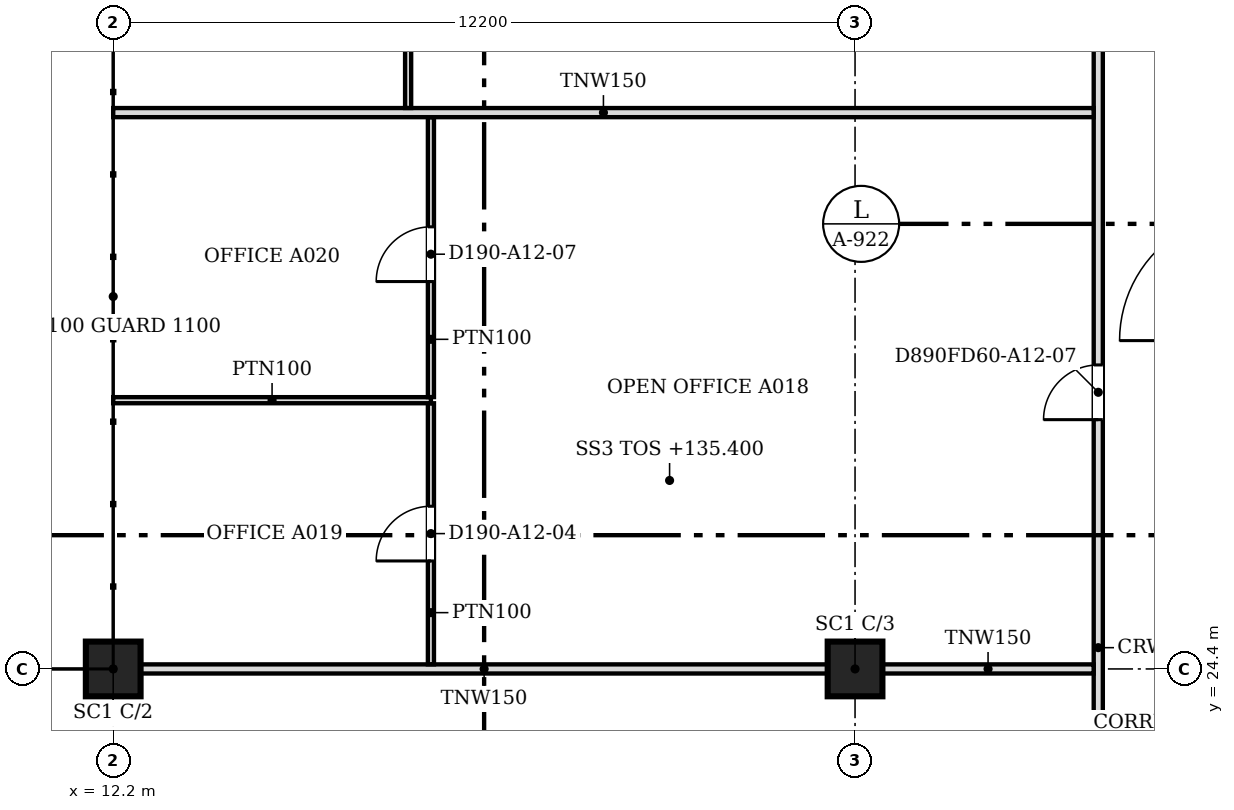
"""IFC4 building model, lengths in metres.
Left out: names, types, materials, properties, quantities, classifications, styles, units other than length and angle.
Written with IfcOpenShell. Run it as: python <this file> out.ifc"""

import sys

from ifc_helpers import new_model, si_unit, direction, frame, frame_2d, origin, origin_2d, place, context, subcontext, project, spatial, rectangle, extrude, source, transform, mapped, element, fill, save


model = new_model("IFC4")
c1 = context("Model", 3, precision=1e-05, world=origin(), true_north=direction((0.0, 1.0)))
c2 = subcontext(c1, "Body", "Model", "MODEL_VIEW")
j1 = project(units=[si_unit("LENGTHUNIT", "METRE"), si_unit("PLANEANGLEUNIT", "RADIAN")], contexts=[c1])
p1 = place(None, origin())
s1 = spatial("IfcSite", under=j1, at=p1, CompositionType="ELEMENT")
p2 = place(p1, origin())
s2 = spatial("IfcBuilding", under=s1, at=p2, CompositionType="ELEMENT")
p3 = place(p2, frame((0.0, 0.0, 135.4)))
s3 = spatial("IfcBuildingStorey", under=s2, at=p3, CompositionType="ELEMENT", Elevation=135.4)
for number, where, z_axis, x_axis in (
    (1, (12.2, 24.4, 0.0), (0.0, 0.0, 1.0), (1.0, 0.0, 0.0)),
    (2, (24.4, 24.4, 0.0), (0.0, 0.0, 1.0), (1.0, 0.0, 0.0)),
):
    element("IfcColumn", number, at=place(p3, frame(where, z_axis=z_axis, x_axis=x_axis)), inside=s3, PredefinedType="COLUMN", context=c2, shape_type="SweptSolid", body=[
        extrude(rectangle(XDim=0.9, YDim=0.9, at=origin_2d()), origin(), (0.0, 0.0, 1.0), 3.6),
    ])
p4 = place(p3, frame((28.4, 18.8, 0.0), z_axis=(0.0, 0.0, 1.0), x_axis=(0.0, 1.0, 0.0)))
e3 = element("IfcWall", 3, at=p4, inside=s3, PredefinedType="PARTITIONING", context=c2, shape_type="SweptSolid", body=[
    extrude(rectangle(XDim=26.824, YDim=0.15, at=frame_2d((13.412, 0.0))), origin(), (0.0, 0.0, 1.0), 3.067),
])
m1 = source(origin(), c2, "Body", "SweptSolid", [
    extrude(rectangle(XDim=0.9, YDim=2.1, at=frame_2d((0.45, 1.05))), frame((0.0, 0.085, 0.0), z_axis=(0.0, -1.0, 0.0), x_axis=(1.0, 0.0, 0.0)), (0.0, 0.0, 1.0), 0.17),
])
p5 = place(p4, frame((1.3, 0.0, 0.0)))
e4 = element("IfcOpeningElement", 4, at=p5, cuts=e3, PredefinedType="OPENING", context=c2, shape_type="MappedRepresentation", body=[
    mapped(m1, transform((0.0, 0.0, 0.0), scale=1.0)),
])
p6 = place(p4, frame((23.351, 0.0, 0.0)))
e5 = element("IfcOpeningElement", 5, at=p6, cuts=e3, PredefinedType="OPENING", context=c2, shape_type="MappedRepresentation", body=[
    mapped(m1, transform((0.0, 0.0, 0.0), scale=1.0)),
])
p7 = place(p4, frame((17.351, 0.0, 0.0)))
e6 = element("IfcOpeningElement", 6, at=p7, cuts=e3, PredefinedType="OPENING", context=c2, shape_type="MappedRepresentation", body=[
    mapped(m1, transform((0.0, 0.0, 0.0), scale=1.0)),
])
p8 = place(p4, frame((9.7, 0.0, 0.0)))
e7 = element("IfcOpeningElement", 7, at=p8, cuts=e3, PredefinedType="OPENING", context=c2, shape_type="MappedRepresentation", body=[
    mapped(m1, transform((0.0, 0.0, 0.0), scale=1.0)),
])
p9 = place(p3, frame((12.651, 24.4, 0.0), z_axis=(0.0, 0.0, 1.0), x_axis=(1.0, 0.0, 0.0)))
e8 = element("IfcWall", 8, at=p9, inside=s3, PredefinedType="PARTITIONING", context=c2, shape_type="SweptSolid", body=[
    extrude(rectangle(XDim=11.298, YDim=0.15, at=frame_2d((5.649, 0.0))), origin(), (0.0, 0.0, 1.0), 3.067),
])
p10 = place(p3, frame((24.851, 24.4, 0.0), z_axis=(0.0, 0.0, 1.0), x_axis=(1.0, 0.0, 0.0)))
e9 = element("IfcWall", 9, at=p10, inside=s3, PredefinedType="PARTITIONING", context=c2, shape_type="SweptSolid", body=[
    extrude(rectangle(XDim=3.473, YDim=0.15, at=frame_2d((1.736, 0.0))), origin(), (0.0, 0.0, 1.0), 3.067),
])
p11 = place(p3, frame((17.425, 24.476, 0.0), z_axis=(0.0, 0.0, 1.0), x_axis=(0.0, 1.0, 0.0)))
e10 = element("IfcWall", 10, at=p11, inside=s3, PredefinedType="PARTITIONING", context=c2, shape_type="SweptSolid", body=[
    extrude(rectangle(XDim=4.293, YDim=0.1, at=frame_2d((2.146, 0.0))), origin(), (0.0, 0.0, 1.0), 3.067),
])
m2 = source(origin(), c2, "Body", "SweptSolid", [
    extrude(rectangle(XDim=0.9, YDim=2.1, at=frame_2d((0.45, 1.05))), frame((0.0, 0.06, 0.0), z_axis=(0.0, -1.0, 0.0), x_axis=(1.0, 0.0, 0.0)), (0.0, 0.0, 1.0), 0.12),
])
p12 = place(p11, frame((1.7, 0.0, 0.0)))
e11 = element("IfcOpeningElement", 11, at=p12, cuts=e10, PredefinedType="OPENING", context=c2, shape_type="MappedRepresentation", body=[
    mapped(m2, transform((0.0, 0.0, 0.0), scale=1.0)),
])
p13 = place(p3, frame((12.2, 28.82, 0.0), z_axis=(0.0, 0.0, 1.0), x_axis=(1.0, 0.0, 0.0)))
e12 = element("IfcWall", 12, at=p13, inside=s3, PredefinedType="PARTITIONING", context=c2, shape_type="SweptSolid", body=[
    extrude(rectangle(XDim=5.225, YDim=0.1, at=frame_2d((2.613, 0.0))), origin(), (0.0, 0.0, 1.0), 3.067),
])
p14 = place(p3, frame((17.425, 28.871, 0.0), z_axis=(0.0, 0.0, 1.0), x_axis=(0.0, 1.0, 0.0)))
e13 = element("IfcWall", 13, at=p14, inside=s3, PredefinedType="PARTITIONING", context=c2, shape_type="SweptSolid", body=[
    extrude(rectangle(XDim=4.603, YDim=0.1, at=frame_2d((2.301, 0.0))), origin(), (0.0, 0.0, 1.0), 3.067),
])
p15 = place(p14, frame((1.9, 0.0, 0.0)))
e14 = element("IfcOpeningElement", 14, at=p15, cuts=e13, PredefinedType="OPENING", context=c2, shape_type="MappedRepresentation", body=[
    mapped(m2, transform((0.0, 0.0, 0.0), scale=1.0)),
])
p16 = place(p3, frame((12.2, 33.55, 0.0), z_axis=(0.0, 0.0, 1.0), x_axis=(1.0, 0.0, 0.0)))
e15 = element("IfcWall", 15, at=p16, inside=s3, PredefinedType="PARTITIONING", context=c2, shape_type="SweptSolid", body=[
    extrude(rectangle(XDim=16.124, YDim=0.15, at=frame_2d((8.062, 0.0))), origin(), (0.0, 0.0, 1.0), 3.067),
])
p17 = place(p3, frame((17.05, 33.626, 0.0), z_axis=(0.0, 0.0, 1.0), x_axis=(0.0, 1.0, 0.0)))
e16 = element("IfcWall", 16, at=p17, inside=s3, PredefinedType="PARTITIONING", context=c2, shape_type="SweptSolid", body=[
    extrude(rectangle(XDim=5.948, YDim=0.1, at=frame_2d((2.974, 0.0))), origin(), (0.0, 0.0, 1.0), 3.067),
])
p18 = place(p17, frame((2.5, 0.0, 0.0)))
e17 = element("IfcOpeningElement", 17, at=p18, cuts=e16, PredefinedType="OPENING", context=c2, shape_type="MappedRepresentation", body=[
    mapped(m2, transform((0.0, 0.0, 0.0), scale=1.0)),
])
m3 = source(origin(), c2, "Body", "SweptSolid", [
    extrude(rectangle(XDim=0.9, YDim=2.1, at=frame_2d((0.45, 1.05))), frame((0.0, 0.025, 0.0), z_axis=(0.0, -1.0, 0.0), x_axis=(1.0, 0.0, 0.0)), (0.0, 0.0, 1.0), 0.05),
])
p19 = place(p12, origin())
e18 = element("IfcDoor", 18, at=p19, inside=s3, OperationType="SINGLE_SWING_LEFT", PredefinedType="DOOR", context=c2, shape_type="MappedRepresentation", body=[
    mapped(m3, transform((0.0, 0.0, 0.0), scale=1.0)),
])
fill(e11, e18)
p20 = place(p15, origin())
e19 = element("IfcDoor", 19, at=p20, inside=s3, OperationType="SINGLE_SWING_LEFT", PredefinedType="DOOR", context=c2, shape_type="MappedRepresentation", body=[
    mapped(m3, transform((0.0, 0.0, 0.0), scale=1.0)),
])
fill(e14, e19)
p21 = place(p8, origin())
e20 = element("IfcDoor", 20, at=p21, inside=s3, OperationType="SINGLE_SWING_LEFT", PredefinedType="DOOR", context=c2, shape_type="MappedRepresentation", body=[
    mapped(m3, transform((0.0, 0.0, 0.0), scale=1.0)),
])
fill(e7, e20)
save(model, sys.argv[1])
